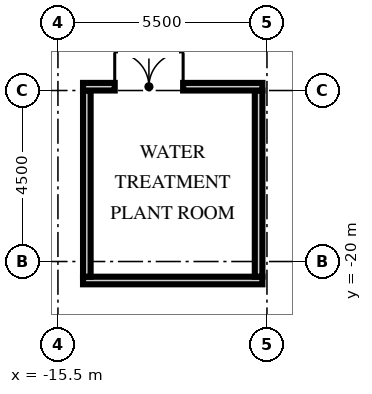
"""IFC4 building model, lengths in metres.
Left out: names, types, materials, properties, quantities, classifications, styles, units other than length and angle.
Written with IfcOpenShell. Run it as: python <this file> out.ifc"""

import sys

from ifc_helpers import new_model, si_unit, direction, frame, frame_2d, origin, origin_2d, place, context, subcontext, project, spatial, rectangle, extrude, element, fill, save


model = new_model("IFC4")
c1 = context("Model", 3, precision=1e-05, world=origin(), true_north=direction((0.0, 1.0)))
c2 = subcontext(c1, "Body", "Model", "MODEL_VIEW")
j1 = project(units=[si_unit("LENGTHUNIT", "METRE"), si_unit("PLANEANGLEUNIT", "RADIAN")], contexts=[c1])
p1 = place(None, origin())
s1 = spatial("IfcSite", under=j1, at=p1, CompositionType="ELEMENT")
p2 = place(p1, origin())
s2 = spatial("IfcBuilding", under=s1, at=p2, CompositionType="ELEMENT")
p3 = place(p2, frame((0.0, 0.0, 278.25)))
s3 = spatial("IfcBuildingStorey", under=s2, at=p3, CompositionType="ELEMENT", Elevation=278.25)
p4 = place(p3, frame((-8.32, -24.4, -0.65), z_axis=(0.103601510687, 0.332963994967, 0.937230870724), x_axis=(0.994618884766, -0.034712905596, -0.097612951251)))
e1 = element("IfcColumn", 1, at=p4, inside=s3, PredefinedType="COLUMN", context=c2, shape_type="SweptSolid", body=[
    extrude(rectangle(XDim=2.8, YDim=1.8, at=origin_2d()), origin(), (0.0, 0.0, 1.0), 8.109),
])
p5 = place(p3, frame((-16.64, -24.4, -0.65), z_axis=(0.203917129379, 0.327731366633, 0.922502008492), x_axis=(0.978988153279, -0.068255512614, -0.192154575114)))
e2 = element("IfcColumn", 2, at=p5, inside=s3, PredefinedType="COLUMN", context=c2, shape_type="SweptSolid", body=[
    extrude(rectangle(XDim=2.8, YDim=1.8, at=origin_2d()), origin(), (0.0, 0.0, 1.0), 8.238),
])
p6 = place(p3, frame((-14.84, -20.5, 0.0), z_axis=(0.0, 0.0, 1.0), x_axis=(1.0, 0.0, 0.0)))
e3 = element("IfcWall", 3, at=p6, inside=s3, PredefinedType="SOLIDWALL", context=c2, shape_type="SweptSolid", body=[
    extrude(rectangle(XDim=4.72, YDim=0.2, at=frame_2d((2.36, 0.0))), origin(), (0.0, 0.0, 1.0), 6.25),
])
p7 = place(p3, frame((-14.74, -20.4, 0.0), z_axis=(0.0, 0.0, 1.0), x_axis=(0.0, 1.0, 0.0)))
e4 = element("IfcWall", 4, at=p7, inside=s3, PredefinedType="SOLIDWALL", context=c2, shape_type="SweptSolid", body=[
    extrude(rectangle(XDim=4.9, YDim=0.2, at=frame_2d((2.45, 0.0))), origin(), (0.0, 0.0, 1.0), 6.25),
])
p8 = place(p3, frame((-10.22, -20.4, 0.0), z_axis=(0.0, 0.0, 1.0), x_axis=(0.0, 1.0, 0.0)))
e5 = element("IfcWall", 5, at=p8, inside=s3, PredefinedType="SOLIDWALL", context=c2, shape_type="SweptSolid", body=[
    extrude(rectangle(XDim=4.9, YDim=0.2, at=frame_2d((2.45, 0.0))), origin(), (0.0, 0.0, 1.0), 7.25),
])
p9 = place(p3, frame((-14.84, -15.4, 0.0), z_axis=(0.0, 0.0, 1.0), x_axis=(1.0, 0.0, 0.0)))
e6 = element("IfcWall", 6, at=p9, inside=s3, PredefinedType="SOLIDWALL", context=c2, shape_type="SweptSolid", body=[
    extrude(rectangle(XDim=4.72, YDim=0.2, at=frame_2d((2.36, 0.0))), origin(), (0.0, 0.0, 1.0), 6.25),
])
p10 = place(p9, frame((0.834, 0.0, 0.0)))
e7 = element("IfcOpeningElement", 7, at=p10, cuts=e6, PredefinedType="OPENING", context=c2, shape_type="SweptSolid", body=[
    extrude(rectangle(XDim=1.8, YDim=2.4, at=frame_2d((0.9, 1.2))), frame((0.0, 0.11, 0.0), z_axis=(0.0, -1.0, 0.0), x_axis=(1.0, 0.0, 0.0)), (0.0, 0.0, 1.0), 0.22),
])
p11 = place(p10, origin())
e8 = element("IfcDoor", 8, at=p11, inside=s3, OperationType="DOUBLE_DOOR_SINGLE_SWING", PredefinedType="DOOR", context=c2, shape_type="SweptSolid", body=[
    extrude(rectangle(XDim=1.8, YDim=2.4, at=frame_2d((0.9, 1.2))), frame((0.0, 0.025, 0.0), z_axis=(0.0, -1.0, 0.0), x_axis=(1.0, 0.0, 0.0)), (0.0, 0.0, 1.0), 0.05),
])
fill(e7, e8)
save(model, sys.argv[1])
